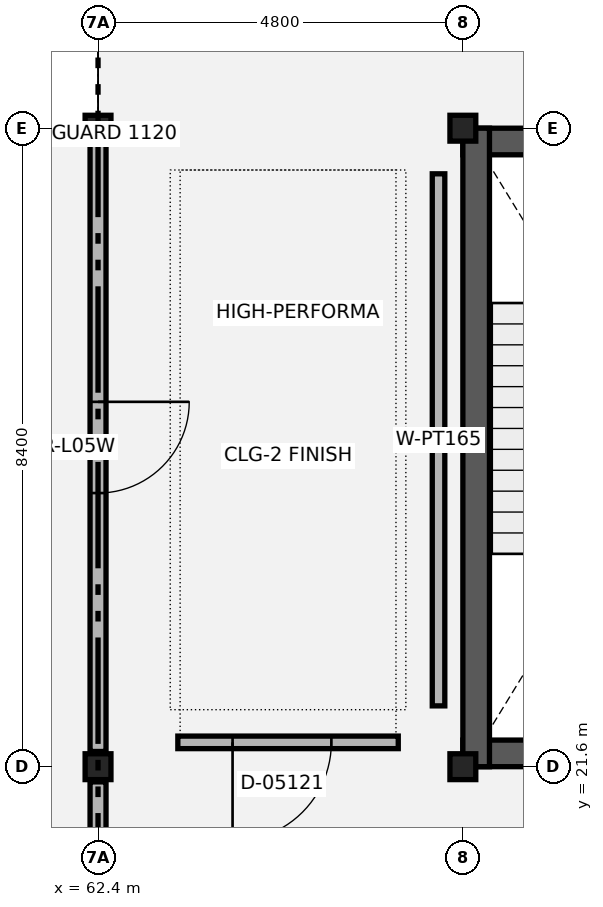
"""IFC4 building model, lengths in metres.
Left out: names, types, materials, properties, quantities, classifications, styles, units other than length and angle.
Written with IfcOpenShell. Run it as: python <this file> out.ifc"""

import sys

from ifc_helpers import new_model, si_unit, direction, frame, frame_2d, origin, origin_2d, place, context, subcontext, project, spatial, rectangle, extrude, element, fill, save


model = new_model("IFC4")
c1 = context("Model", 3, precision=1e-05, world=origin(), true_north=direction((0.0, 1.0)))
c2 = subcontext(c1, "Body", "Model", "MODEL_VIEW")
j1 = project(units=[si_unit("LENGTHUNIT", "METRE"), si_unit("PLANEANGLEUNIT", "RADIAN")], contexts=[c1])
p1 = place(None, origin())
s1 = spatial("IfcSite", under=j1, at=p1, CompositionType="ELEMENT")
p2 = place(p1, origin())
s2 = spatial("IfcBuilding", under=s1, at=p2, CompositionType="ELEMENT")
p3 = place(p2, frame((0.0, 0.0, 22.8)))
s3 = spatial("IfcBuildingStorey", under=s2, at=p3, CompositionType="ELEMENT", Elevation=22.8)
for number, where, z_axis, x_axis in (
    (1, (62.4, 21.6, 0.0), (0.0, 0.0, 1.0), (1.0, 0.0, 0.0)),
    (2, (62.4, 30.0, 0.0), (0.0, 0.0, 1.0), (1.0, 0.0, 0.0)),
    (3, (67.2, 21.6, 0.0), (0.0, 0.0, 1.0), (1.0, 0.0, 0.0)),
    (4, (67.2, 30.0, 0.0), (0.0, 0.0, 1.0), (1.0, 0.0, 0.0)),
):
    element("IfcColumn", number, at=place(p3, frame(where, z_axis=z_axis, x_axis=x_axis)), inside=s3, PredefinedType="COLUMN", context=c2, shape_type="SweptSolid", body=[
        extrude(rectangle(XDim=0.34, YDim=0.34, at=origin_2d()), origin(), (0.0, 0.0, 1.0), 4.2),
    ])
p4 = place(p3, frame((62.4, 29.8, 0.0), z_axis=(0.0, 0.0, 1.0), x_axis=(0.0, -1.0, 0.0)))
e5 = element("IfcWall", 5, at=p4, inside=s3, PredefinedType="SOLIDWALL", context=c2, shape_type="SweptSolid", body=[
    extrude(rectangle(XDim=8.0, YDim=0.21, at=frame_2d((4.0, 0.0))), origin(), (0.0, 0.0, 1.0), 3.07),
])
p5 = place(p4, frame((3.4, 0.0, 0.0)))
e6 = element("IfcOpeningElement", 6, at=p5, cuts=e5, PredefinedType="OPENING", context=c2, shape_type="SweptSolid", body=[
    extrude(rectangle(XDim=1.2, YDim=2.15, at=frame_2d((0.6, 1.075))), frame((0.0, 0.115, 0.0), z_axis=(0.0, -1.0, 0.0), x_axis=(1.0, 0.0, 0.0)), (0.0, 0.0, 1.0), 0.23),
])
p6 = place(p3, frame((62.4, 21.4, 0.0), z_axis=(0.0, 0.0, 1.0), x_axis=(0.0, -1.0, 0.0)))
e7 = element("IfcWall", 7, at=p6, inside=s3, PredefinedType="SOLIDWALL", context=c2, shape_type="SweptSolid", body=[
    extrude(rectangle(XDim=8.0, YDim=0.21, at=frame_2d((4.0, 0.0))), origin(), (0.0, 0.0, 1.0), 3.07),
])
p7 = place(p6, frame((3.1, 0.0, 0.9)))
e8 = element("IfcOpeningElement", 8, at=p7, cuts=e7, PredefinedType="OPENING", context=c2, shape_type="SweptSolid", body=[
    extrude(rectangle(XDim=1.8, YDim=1.5, at=frame_2d((0.9, 0.75))), frame((0.0, 0.115, 0.0), z_axis=(0.0, -1.0, 0.0), x_axis=(1.0, 0.0, 0.0)), (0.0, 0.0, 1.0), 0.23),
])
for number, where, z_axis, x_axis in (
    (9, (67.2, 29.825, 0.0), (0.0, 0.0, 1.0), (1.0, 0.0, 0.0)),
    (10, (67.2, 21.775, 0.0), (0.0, 0.0, 1.0), (1.0, 0.0, 0.0)),
):
    element("IfcWall", number, at=place(p3, frame(where, z_axis=z_axis, x_axis=x_axis)), inside=s3, PredefinedType="SHEAR", context=c2, shape_type="SweptSolid", body=[
        extrude(rectangle(XDim=9.6, YDim=0.35, at=frame_2d((4.8, 0.0))), origin(), (0.0, 0.0, 1.0), 3.97),
    ])
p8 = place(p3, frame((67.375, 21.6, 0.0), z_axis=(0.0, 0.0, 1.0), x_axis=(0.0, 1.0, 0.0)))
e11 = element("IfcWall", 11, at=p8, inside=s3, PredefinedType="SHEAR", context=c2, shape_type="SweptSolid", body=[
    extrude(rectangle(XDim=8.4, YDim=0.35, at=frame_2d((4.2, 0.0))), origin(), (0.0, 0.0, 1.0), 3.97),
])
p9 = place(p3, frame((63.45, 21.92, 0.0), z_axis=(0.0, 0.0, 1.0), x_axis=(1.0, 0.0, 0.0)))
e12 = element("IfcWall", 12, at=p9, inside=s3, PredefinedType="PARTITIONING", context=c2, shape_type="SweptSolid", body=[
    extrude(rectangle(XDim=2.9, YDim=0.165, at=frame_2d((1.45, 0.0))), origin(), (0.0, 0.0, 1.0), 3.05),
])
p10 = place(p9, frame((0.72, 0.0, 0.0)))
e13 = element("IfcOpeningElement", 13, at=p10, cuts=e12, PredefinedType="OPENING", context=c2, shape_type="SweptSolid", body=[
    extrude(rectangle(XDim=1.3, YDim=2.15, at=frame_2d((0.65, 1.075))), frame((0.0, 0.093, 0.0), z_axis=(0.0, -1.0, 0.0), x_axis=(1.0, 0.0, 0.0)), (0.0, 0.0, 1.0), 0.185),
])
p11 = place(p3, frame((66.88, 22.4, 0.0), z_axis=(0.0, 0.0, 1.0), x_axis=(0.0, 1.0, 0.0)))
e14 = element("IfcWall", 14, at=p11, inside=s3, PredefinedType="PARTITIONING", context=c2, shape_type="SweptSolid", body=[
    extrude(rectangle(XDim=7.0, YDim=0.165, at=frame_2d((3.5, 0.0))), origin(), (0.0, 0.0, 1.0), 3.05),
])
p12 = place(p5, origin())
e15 = element("IfcDoor", 15, at=p12, inside=s3, OperationType="SINGLE_SWING_LEFT", PredefinedType="DOOR", context=c2, shape_type="SweptSolid", body=[
    extrude(rectangle(XDim=1.2, YDim=2.15, at=frame_2d((0.6, 1.075))), frame((0.0, 0.025, 0.0), z_axis=(0.0, -1.0, 0.0), x_axis=(1.0, 0.0, 0.0)), (0.0, 0.0, 1.0), 0.05),
])
fill(e6, e15)
p13 = place(p10, origin())
e16 = element("IfcDoor", 16, at=p13, inside=s3, OperationType="SINGLE_SWING_RIGHT", PredefinedType="DOOR", context=c2, shape_type="SweptSolid", body=[
    extrude(rectangle(XDim=1.3, YDim=2.15, at=frame_2d((0.65, 1.075))), frame((0.0, 0.025, 0.0), z_axis=(0.0, -1.0, 0.0), x_axis=(1.0, 0.0, 0.0)), (0.0, 0.0, 1.0), 0.05),
])
fill(e13, e16)
save(model, sys.argv[1])
